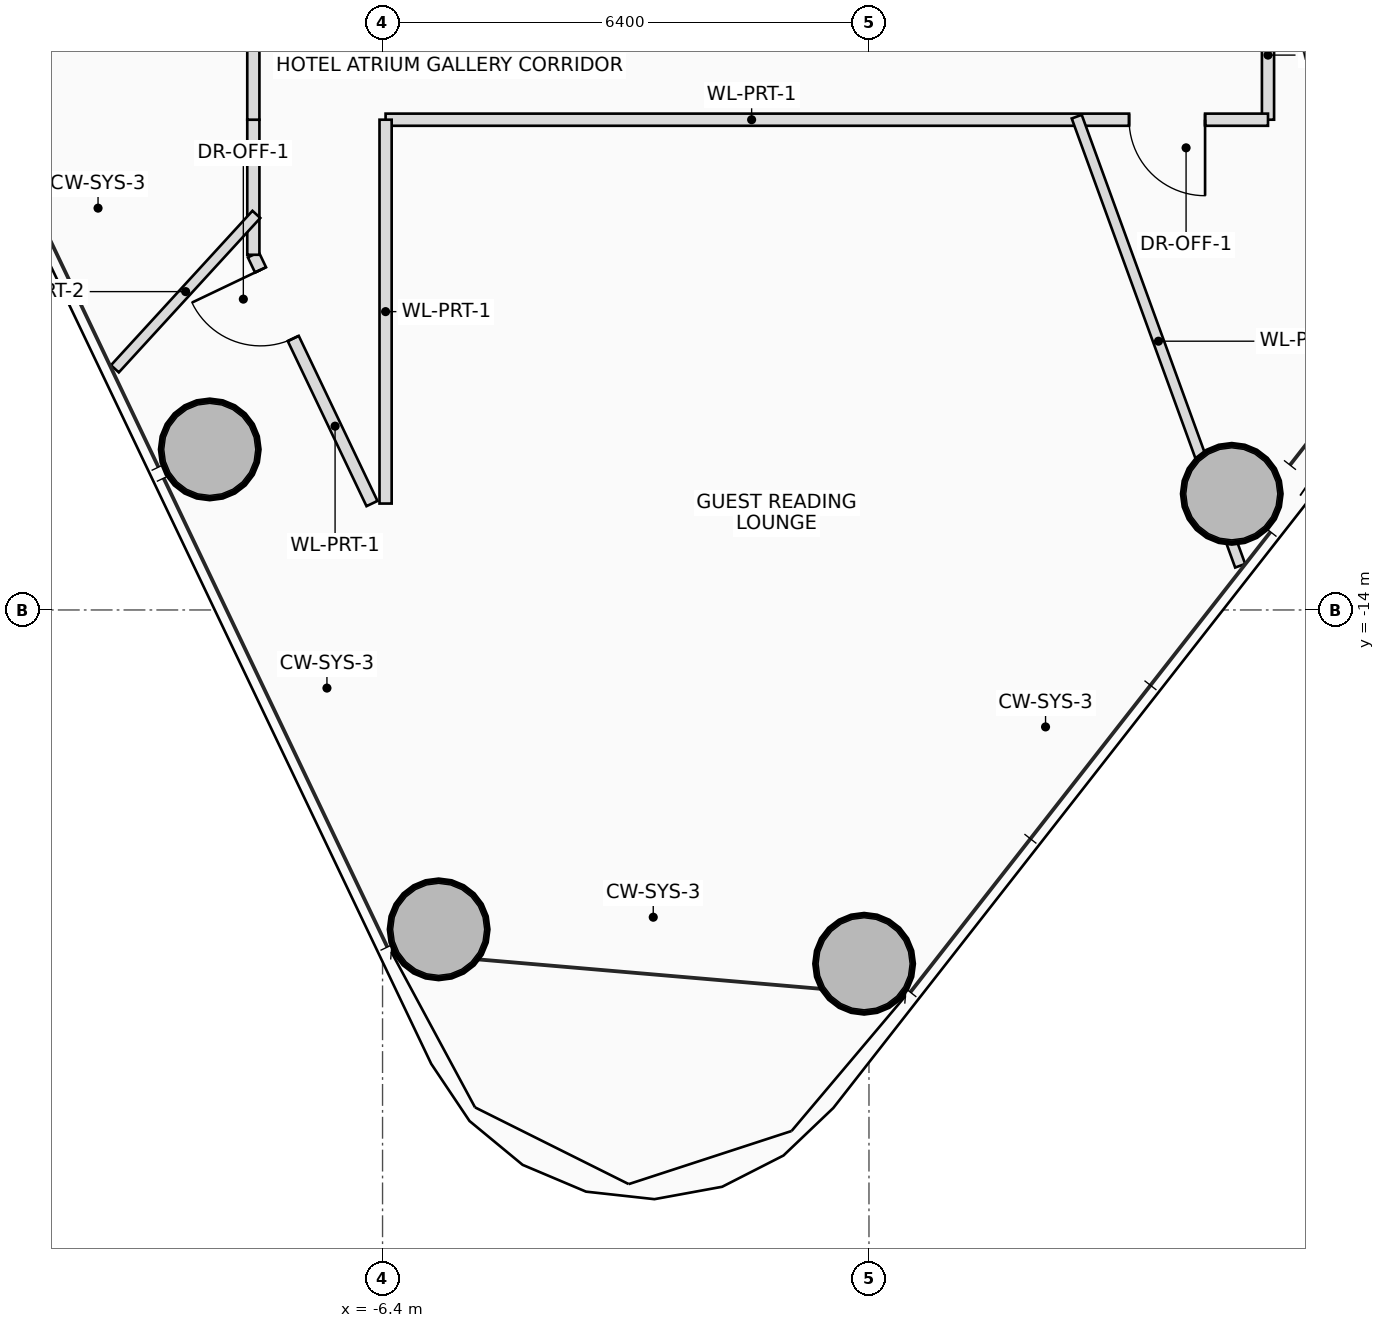
"""IFC4 building model, lengths in metres.
Left out: names, types, materials, properties, quantities, classifications, styles, units other than length and angle.
Written with IfcOpenShell. Run it as: python <this file> out.ifc"""

import sys

from ifc_helpers import new_model, si_unit, direction, frame, frame_2d, origin, origin_2d, place, context, subcontext, project, spatial, rectangle, hollow_circle, extrude, source, transform, mapped, element, fill, save


model = new_model("IFC4")
c1 = context("Model", 3, precision=1e-05, world=origin(), true_north=direction((0.0, 1.0)))
c2 = subcontext(c1, "Body", "Model", "MODEL_VIEW")
j1 = project(units=[si_unit("LENGTHUNIT", "METRE"), si_unit("PLANEANGLEUNIT", "RADIAN")], contexts=[c1])
p1 = place(None, origin())
s1 = spatial("IfcSite", under=j1, at=p1, CompositionType="ELEMENT")
p2 = place(p1, origin())
s2 = spatial("IfcBuilding", under=s1, at=p2, CompositionType="ELEMENT")
p3 = place(p2, frame((0.0, 0.0, 132.95)))
s3 = spatial("IfcBuildingStorey", under=s2, at=p3, CompositionType="ELEMENT", Elevation=132.95)
m1 = source(origin(), c2, "Body", "SweptSolid", [
    extrude(hollow_circle(Radius=0.65, WallThickness=0.045, at=origin_2d()), origin(), (0.0, 0.0, 1.0), 3.45),
])
for number, where, z_axis, x_axis in (
    (1, (-0.064, -18.655, 0.0), (0.0, 0.0, 1.0), (1.0, 0.0, 0.0)),
    (2, (4.773, -12.472, 0.0), (0.0, 0.0, 1.0), (1.0, 0.0, 0.0)),
    (3, (-8.674, -11.888, 0.0), (0.0, 0.0, 1.0), (1.0, 0.0, 0.0)),
    (4, (-5.662, -18.202, 0.0), (0.0, 0.0, 1.0), (1.0, 0.0, 0.0)),
):
    element("IfcColumn", number, at=place(p3, frame(where, z_axis=z_axis, x_axis=x_axis)), inside=s3, PredefinedType="COLUMN", context=c2, shape_type="MappedRepresentation", body=[
        mapped(m1, transform((0.0, 0.0, 0.0), scale=1.0)),
    ])
p4 = place(p3, frame((-6.539, -12.6, 0.0), z_axis=(0.0, 0.0, 1.0), x_axis=(-0.430521464151, 0.902580339308, 0.0)))
e5 = element("IfcWall", 5, at=p4, inside=s3, PredefinedType="PARTITIONING", context=c2, shape_type="SweptSolid", body=[
    extrude(rectangle(XDim=3.626, YDim=0.16, at=frame_2d((1.813, 0.0))), origin(), (0.0, 0.0, 1.0), 2.605),
])
p5 = place(p4, frame((2.406, 0.0, 0.0)))
e6 = element("IfcOpeningElement", 6, at=p5, cuts=e5, PredefinedType="OPENING", context=c2, shape_type="SweptSolid", body=[
    extrude(rectangle(XDim=1.0, YDim=2.25, at=frame_2d((0.5, 1.125))), frame((0.0, 0.09, 0.0), z_axis=(0.0, -1.0, 0.0), x_axis=(1.0, 0.0, 0.0)), (0.0, 0.0, 1.0), 0.18),
])
p6 = place(p3, frame((-8.1, -9.327, 0.0), z_axis=(0.0, 0.0, 1.0), x_axis=(0.0, 1.0, 0.0)))
e7 = element("IfcWall", 7, at=p6, inside=s3, PredefinedType="PARTITIONING", context=c2, shape_type="SweptSolid", body=[
    extrude(rectangle(XDim=1.777, YDim=0.16, at=frame_2d((0.888, 0.0))), origin(), (0.0, 0.0, 1.0), 3.25),
])
p7 = place(p3, frame((-8.1, -7.55, 0.0), z_axis=(0.0, 0.0, 1.0), x_axis=(0.0, 1.0, 0.0)))
e8 = element("IfcWall", 8, at=p7, inside=s3, PredefinedType="PARTITIONING", context=c2, shape_type="SweptSolid", body=[
    extrude(rectangle(XDim=15.1, YDim=0.16, at=frame_2d((7.55, 0.0))), origin(), (0.0, 0.0, 1.0), 2.605),
])
p8 = place(p7, frame((2.989, 0.0, 0.0)))
e9 = element("IfcOpeningElement", 9, at=p8, cuts=e8, PredefinedType="OPENING", context=c2, shape_type="SweptSolid", body=[
    extrude(rectangle(XDim=0.9, YDim=2.05, at=frame_2d((0.45, 1.025))), frame((0.0, 0.09, 0.0), z_axis=(0.0, -1.0, 0.0), x_axis=(1.0, 0.0, 0.0)), (0.0, 0.0, 1.0), 0.18),
])
p9 = place(p7, frame((10.301, 0.0, 0.0)))
e10 = element("IfcOpeningElement", 10, at=p9, cuts=e8, PredefinedType="OPENING", context=c2, shape_type="SweptSolid", body=[
    extrude(rectangle(XDim=1.0, YDim=2.25, at=frame_2d((0.5, 1.125))), frame((0.0, 0.09, 0.0), z_axis=(0.0, -1.0, 0.0), x_axis=(1.0, 0.0, 0.0)), (0.0, 0.0, 1.0), 0.18),
])
p10 = place(p3, frame((5.25, -5.85, 0.0), z_axis=(0.0, 0.0, 1.0), x_axis=(0.0, -1.0, 0.0)))
e11 = element("IfcWall", 11, at=p10, inside=s3, PredefinedType="PARTITIONING", context=c2, shape_type="SweptSolid", body=[
    extrude(rectangle(XDim=1.7, YDim=0.16, at=frame_2d((0.85, 0.0))), origin(), (0.0, 0.0, 1.0), 3.25),
])
p11 = place(p3, frame((5.25, -7.55, 0.0), z_axis=(0.0, 0.0, 1.0), x_axis=(-1.0, 0.0, 0.0)))
e12 = element("IfcWall", 12, at=p11, inside=s3, PredefinedType="PARTITIONING", context=c2, shape_type="SweptSolid", body=[
    extrude(rectangle(XDim=11.61, YDim=0.16, at=frame_2d((5.805, 0.0))), origin(), (0.0, 0.0, 1.0), 2.605),
])
p12 = place(p11, frame((0.828, 0.0, 0.0)))
e13 = element("IfcOpeningElement", 13, at=p12, cuts=e12, PredefinedType="OPENING", context=c2, shape_type="SweptSolid", body=[
    extrude(rectangle(XDim=1.0, YDim=2.25, at=frame_2d((0.5, 1.125))), frame((0.0, 0.09, 0.0), z_axis=(0.0, -1.0, 0.0), x_axis=(1.0, 0.0, 0.0)), (0.0, 0.0, 1.0), 0.18),
])
p13 = place(p3, frame((-6.36, -7.55, 0.0), z_axis=(0.0, 0.0, 1.0), x_axis=(0.0, -1.0, 0.0)))
e14 = element("IfcWall", 14, at=p13, inside=s3, PredefinedType="PARTITIONING", context=c2, shape_type="SweptSolid", body=[
    extrude(rectangle(XDim=5.05, YDim=0.16, at=frame_2d((2.525, 0.0))), origin(), (0.0, 0.0, 1.0), 3.25),
])
p14 = place(p3, frame((-8.06, -8.796, 0.0), z_axis=(0.0, 0.0, 1.0), x_axis=(-0.67555207399, -0.737312278026, 0.0)))
e15 = element("IfcWall", 15, at=p14, inside=s3, PredefinedType="PARTITIONING", context=c2, shape_type="SweptSolid", body=[
    extrude(rectangle(XDim=2.755, YDim=0.14, at=frame_2d((1.378, 0.0))), origin(), (0.0, 0.0, 1.0), 2.765),
])
p15 = place(p3, frame((2.733, -7.51, 0.0), z_axis=(0.0, 0.0, 1.0), x_axis=(0.342029891784, -0.93968907258, 0.0)))
e16 = element("IfcWall", 16, at=p15, inside=s3, PredefinedType="PARTITIONING", context=c2, shape_type="SweptSolid", body=[
    extrude(rectangle(XDim=6.287, YDim=0.14, at=frame_2d((3.144, 0.0))), origin(), (0.0, 0.0, 1.0), 2.805),
])
p16 = place(p5, origin())
e17 = element("IfcDoor", 17, at=p16, inside=s3, OperationType="SINGLE_SWING_RIGHT", PredefinedType="DOOR", context=c2, shape_type="SweptSolid", body=[
    extrude(rectangle(XDim=1.0, YDim=2.25, at=frame_2d((0.5, 1.125))), frame((0.0, 0.025, 0.0), z_axis=(0.0, -1.0, 0.0), x_axis=(1.0, 0.0, 0.0)), (0.0, 0.0, 1.0), 0.05),
])
fill(e6, e17)
p17 = place(p12, origin())
e18 = element("IfcDoor", 18, at=p17, inside=s3, OperationType="SINGLE_SWING_LEFT", PredefinedType="DOOR", context=c2, shape_type="SweptSolid", body=[
    extrude(rectangle(XDim=1.0, YDim=2.25, at=frame_2d((0.5, 1.125))), frame((0.0, 0.025, 0.0), z_axis=(0.0, -1.0, 0.0), x_axis=(1.0, 0.0, 0.0)), (0.0, 0.0, 1.0), 0.05),
])
fill(e13, e18)
save(model, sys.argv[1])
